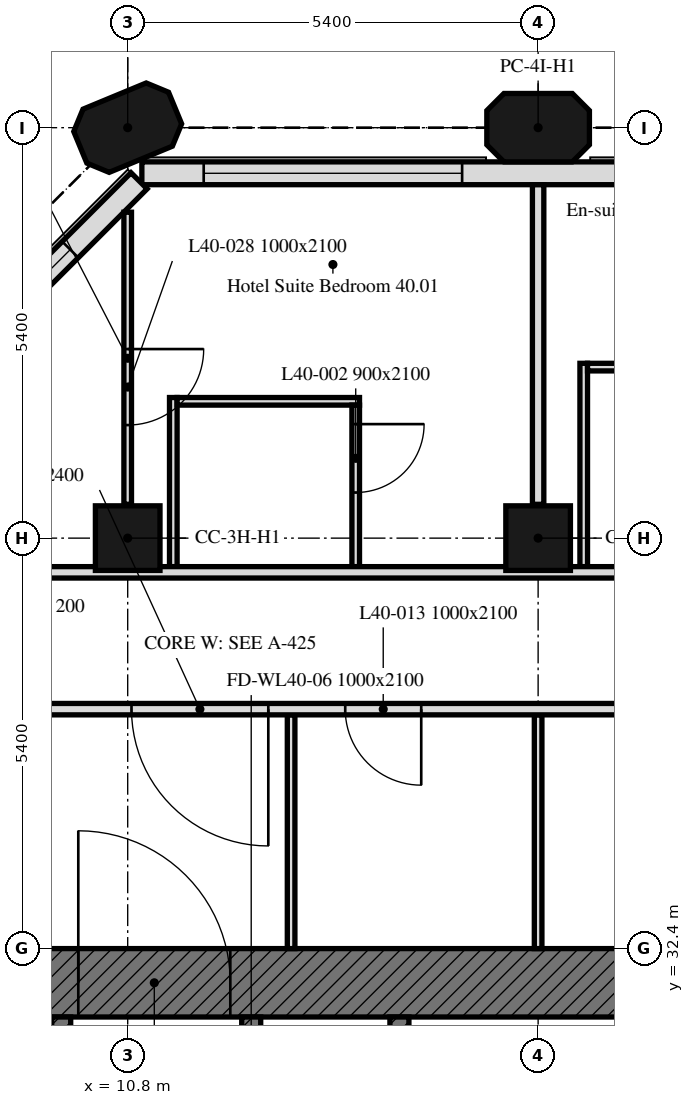
"""IFC4 building model, lengths in metres.
Left out: names, types, materials, properties, quantities, classifications, styles, units other than length and angle.
Written with IfcOpenShell. Run it as: python <this file> out.ifc"""

import sys

from ifc_helpers import new_model, si_unit, direction, frame, frame_2d, origin, origin_2d, place, context, subcontext, project, spatial, polyline, rectangle, outline, extrude, element, fill, save


model = new_model("IFC4")
c1 = context("Model", 3, precision=1e-05, world=origin(), true_north=direction((0.0, 1.0)))
c2 = subcontext(c1, "Body", "Model", "MODEL_VIEW")
j1 = project(units=[si_unit("LENGTHUNIT", "METRE"), si_unit("PLANEANGLEUNIT", "RADIAN")], contexts=[c1])
p1 = place(None, origin())
s1 = spatial("IfcSite", under=j1, at=p1, CompositionType="ELEMENT")
p2 = place(p1, origin())
s2 = spatial("IfcBuilding", under=s1, at=p2, CompositionType="ELEMENT")
p3 = place(p2, frame((0.0, 0.0, 169.3)))
s3 = spatial("IfcBuildingStorey", under=s2, at=p3, CompositionType="ELEMENT", Elevation=169.3)
for number, where, z_axis, x_axis in (
    (1, (10.8, 37.8, 0.0), (0.0, 0.0, 1.0), (1.0, 0.0, 0.0)),
    (2, (16.2, 37.8, 0.0), (0.0, 0.0, 1.0), (1.0, 0.0, 0.0)),
):
    element("IfcColumn", number, at=place(p3, frame(where, z_axis=z_axis, x_axis=x_axis)), inside=s3, PredefinedType="COLUMN", context=c2, shape_type="SweptSolid", body=[
        extrude(rectangle(XDim=0.85, YDim=0.85, at=origin_2d()), origin(), (0.0, 0.0, 1.0), 3.0),
    ])
for number, where, z_axis, x_axis in (
    (3, (10.8, 43.2, 0.0), (0.0, 0.0, 1.0), (0.924, 0.383, 0.0)),
    (4, (16.2, 43.2, 0.0), (0.0, 0.0, 1.0), (1.0, 0.0, 0.0)),
):
    element("IfcColumn", number, at=place(p3, frame(where, z_axis=z_axis, x_axis=x_axis)), inside=s3, PredefinedType="COLUMN", context=c2, shape_type="SweptSolid", body=[
        extrude(outline(polyline([(-0.45, -0.45), (0.45, -0.45), (0.675, -0.225), (0.675, 0.225), (0.45, 0.45), (-0.45, 0.45), (-0.675, 0.225), (-0.675, -0.225), (-0.45, -0.45)])), origin(), (0.0, 0.0, 1.0), 3.0),
    ])
p4 = place(p3, frame((43.014, 42.6, 0.0), z_axis=(0.0, 0.0, 1.0), x_axis=(-1.0, 0.0, 0.0)))
e5 = element("IfcWall", 5, at=p4, inside=s3, PredefinedType="SOLIDWALL", context=c2, shape_type="SweptSolid", body=[
    extrude(rectangle(XDim=32.027, YDim=0.3, at=frame_2d((16.014, 0.0))), origin(), (0.0, 0.0, 1.0), 3.0),
])
p5 = place(p4, frame((2.764, 0.0, 0.9)))
e6 = element("IfcOpeningElement", 6, at=p5, cuts=e5, PredefinedType="OPENING", context=c2, shape_type="SweptSolid", body=[
    extrude(rectangle(XDim=1.1, YDim=1.7, at=frame_2d((0.55, 0.85))), frame((0.0, 0.16, 0.0), z_axis=(0.0, -1.0, 0.0), x_axis=(1.0, 0.0, 0.0)), (0.0, 0.0, 1.0), 0.32),
])
p6 = place(p4, frame((6.214, 0.0, 0.9)))
e7 = element("IfcOpeningElement", 7, at=p6, cuts=e5, PredefinedType="OPENING", context=c2, shape_type="SweptSolid", body=[
    extrude(rectangle(XDim=3.4, YDim=1.7, at=frame_2d((1.7, 0.85))), frame((0.0, 0.16, 0.0), z_axis=(0.0, -1.0, 0.0), x_axis=(1.0, 0.0, 0.0)), (0.0, 0.0, 1.0), 0.32),
])
p7 = place(p4, frame((13.564, 0.0, 0.9)))
e8 = element("IfcOpeningElement", 8, at=p7, cuts=e5, PredefinedType="OPENING", context=c2, shape_type="SweptSolid", body=[
    extrude(rectangle(XDim=1.1, YDim=1.7, at=frame_2d((0.55, 0.85))), frame((0.0, 0.16, 0.0), z_axis=(0.0, -1.0, 0.0), x_axis=(1.0, 0.0, 0.0)), (0.0, 0.0, 1.0), 0.32),
])
p8 = place(p4, frame((17.014, 0.0, 0.9)))
e9 = element("IfcOpeningElement", 9, at=p8, cuts=e5, PredefinedType="OPENING", context=c2, shape_type="SweptSolid", body=[
    extrude(rectangle(XDim=3.4, YDim=1.7, at=frame_2d((1.7, 0.85))), frame((0.0, 0.16, 0.0), z_axis=(0.0, -1.0, 0.0), x_axis=(1.0, 0.0, 0.0)), (0.0, 0.0, 1.0), 0.32),
])
p9 = place(p4, frame((24.364, 0.0, 0.9)))
e10 = element("IfcOpeningElement", 10, at=p9, cuts=e5, PredefinedType="OPENING", context=c2, shape_type="SweptSolid", body=[
    extrude(rectangle(XDim=1.1, YDim=1.7, at=frame_2d((0.55, 0.85))), frame((0.0, 0.16, 0.0), z_axis=(0.0, -1.0, 0.0), x_axis=(1.0, 0.0, 0.0)), (0.0, 0.0, 1.0), 0.32),
])
p10 = place(p4, frame((27.814, 0.0, 0.9)))
e11 = element("IfcOpeningElement", 11, at=p10, cuts=e5, PredefinedType="OPENING", context=c2, shape_type="SweptSolid", body=[
    extrude(rectangle(XDim=3.4, YDim=1.7, at=frame_2d((1.7, 0.85))), frame((0.0, 0.16, 0.0), z_axis=(0.0, -1.0, 0.0), x_axis=(1.0, 0.0, 0.0)), (0.0, 0.0, 1.0), 0.32),
])
p11 = place(p3, frame((10.949, 42.501, 0.0), z_axis=(0.0, 0.0, 1.0), x_axis=(-0.707106781187, -0.707106781187, 0.0)))
e12 = element("IfcWall", 12, at=p11, inside=s3, PredefinedType="SOLIDWALL", context=c2, shape_type="SweptSolid", body=[
    extrude(rectangle(XDim=6.86, YDim=0.3, at=frame_2d((3.43, 0.0))), origin(), (0.0, 0.0, 1.0), 3.0),
])
p12 = place(p11, frame((1.28, 0.0, 0.9)))
e13 = element("IfcOpeningElement", 13, at=p12, cuts=e12, PredefinedType="OPENING", context=c2, shape_type="SweptSolid", body=[
    extrude(rectangle(XDim=1.1, YDim=1.7, at=frame_2d((0.55, 0.85))), frame((0.0, 0.16, 0.0), z_axis=(0.0, -1.0, 0.0), x_axis=(1.0, 0.0, 0.0)), (0.0, 0.0, 1.0), 0.32),
])
p13 = place(p11, frame((4.48, 0.0, 0.9)))
e14 = element("IfcOpeningElement", 14, at=p13, cuts=e12, PredefinedType="OPENING", context=c2, shape_type="SweptSolid", body=[
    extrude(rectangle(XDim=1.1, YDim=1.7, at=frame_2d((0.55, 0.85))), frame((0.0, 0.16, 0.0), z_axis=(0.0, -1.0, 0.0), x_axis=(1.0, 0.0, 0.0)), (0.0, 0.0, 1.0), 0.32),
])
p14 = place(p3, frame((6.6, 31.95, 0.0), z_axis=(0.0, 0.0, 1.0), x_axis=(1.0, 0.0, 0.0)))
e15 = element("IfcWall", 15, at=p14, inside=s3, PredefinedType="SOLIDWALL", context=c2, shape_type="SweptSolid", body=[
    extrude(rectangle(XDim=11.1, YDim=0.9, at=frame_2d((5.55, 0.0))), origin(), (0.0, 0.0, 1.0), 3.0),
])
p15 = place(p14, frame((3.55, 0.0, 0.0)))
e16 = element("IfcOpeningElement", 16, at=p15, cuts=e15, PredefinedType="OPENING", context=c2, shape_type="SweptSolid", body=[
    extrude(rectangle(XDim=2.0, YDim=2.4, at=frame_2d((1.0, 1.2))), frame((0.0, 0.45, 0.0), z_axis=(0.0, -1.0, 0.0), x_axis=(1.0, 0.0, 0.0)), (0.0, 0.0, 1.0), 0.9),
])
p16 = place(p3, frame((9.925, 17.1, 0.0), z_axis=(0.0, 0.0, 1.0), x_axis=(0.0, 1.0, 0.0)))
e17 = element("IfcWall", 17, at=p16, inside=s3, PredefinedType="SOLIDWALL", context=c2, shape_type="SweptSolid", body=[
    extrude(rectangle(XDim=14.4, YDim=0.25, at=frame_2d((7.2, 0.0))), origin(), (0.0, 0.0, 1.0), 3.0),
])
p17 = place(p16, frame((4.6, 0.0, 0.0)))
e18 = element("IfcOpeningElement", 18, at=p17, cuts=e17, PredefinedType="OPENING", context=c2, shape_type="SweptSolid", body=[
    extrude(rectangle(XDim=1.0, YDim=2.1, at=frame_2d((0.5, 1.05))), frame((0.0, 0.125, 0.0), z_axis=(0.0, -1.0, 0.0), x_axis=(1.0, 0.0, 0.0)), (0.0, 0.0, 1.0), 0.25),
])
p18 = place(p16, frame((7.062, 0.0, 0.0)))
e19 = element("IfcOpeningElement", 19, at=p18, cuts=e17, PredefinedType="OPENING", context=c2, shape_type="SweptSolid", body=[
    extrude(rectangle(XDim=1.2, YDim=2.1, at=frame_2d((0.6, 1.05))), frame((0.0, 0.125, 0.0), z_axis=(0.0, -1.0, 0.0), x_axis=(1.0, 0.0, 0.0)), (0.0, 0.0, 1.0), 0.25),
])
p19 = place(p16, frame((10.106, 0.0, 0.0)))
e20 = element("IfcOpeningElement", 20, at=p19, cuts=e17, PredefinedType="OPENING", context=c2, shape_type="SweptSolid", body=[
    extrude(rectangle(XDim=0.9, YDim=2.1, at=frame_2d((0.45, 1.05))), frame((0.0, 0.125, 0.0), z_axis=(0.0, -1.0, 0.0), x_axis=(1.0, 0.0, 0.0)), (0.0, 0.0, 1.0), 0.25),
])
p20 = place(p16, frame((12.048, 0.0, 0.0)))
e21 = element("IfcOpeningElement", 21, at=p20, cuts=e17, PredefinedType="OPENING", context=c2, shape_type="SweptSolid", body=[
    extrude(rectangle(XDim=0.9, YDim=2.1, at=frame_2d((0.45, 1.05))), frame((0.0, 0.125, 0.0), z_axis=(0.0, -1.0, 0.0), x_axis=(1.0, 0.0, 0.0)), (0.0, 0.0, 1.0), 0.25),
])
p21 = place(p16, frame((13.354, 0.0, 0.0)))
e22 = element("IfcOpeningElement", 22, at=p21, cuts=e17, PredefinedType="OPENING", context=c2, shape_type="SweptSolid", body=[
    extrude(rectangle(XDim=0.9, YDim=2.1, at=frame_2d((0.45, 1.05))), frame((0.0, 0.125, 0.0), z_axis=(0.0, -1.0, 0.0), x_axis=(1.0, 0.0, 0.0)), (0.0, 0.0, 1.0), 0.25),
])
p22 = place(p3, frame((14.375, 17.1, 0.0), z_axis=(0.0, 0.0, 1.0), x_axis=(0.0, 1.0, 0.0)))
e23 = element("IfcWall", 23, at=p22, inside=s3, PredefinedType="SOLIDWALL", context=c2, shape_type="SweptSolid", body=[
    extrude(rectangle(XDim=14.4, YDim=0.25, at=frame_2d((7.2, 0.0))), origin(), (0.0, 0.0, 1.0), 3.0),
])
p23 = place(p22, frame((13.15, 0.0, 0.0)))
e24 = element("IfcOpeningElement", 24, at=p23, cuts=e23, PredefinedType="OPENING", context=c2, shape_type="SweptSolid", body=[
    extrude(rectangle(XDim=1.0, YDim=2.1, at=frame_2d((0.5, 1.05))), frame((0.0, 0.125, 0.0), z_axis=(0.0, -1.0, 0.0), x_axis=(1.0, 0.0, 0.0)), (0.0, 0.0, 1.0), 0.25),
])
p24 = place(p22, frame((0.6, 0.0, 0.0)))
e25 = element("IfcOpeningElement", 25, at=p24, cuts=e23, PredefinedType="OPENING", context=c2, shape_type="SweptSolid", body=[
    extrude(rectangle(XDim=1.1, YDim=2.1, at=frame_2d((0.55, 1.05))), frame((0.0, 0.125, 0.0), z_axis=(0.0, -1.0, 0.0), x_axis=(1.0, 0.0, 0.0)), (0.0, 0.0, 1.0), 0.25),
])
p25 = place(p22, frame((3.25, 0.0, 0.0)))
e26 = element("IfcOpeningElement", 26, at=p25, cuts=e23, PredefinedType="OPENING", context=c2, shape_type="SweptSolid", body=[
    extrude(rectangle(XDim=0.9, YDim=2.1, at=frame_2d((0.45, 1.05))), frame((0.0, 0.125, 0.0), z_axis=(0.0, -1.0, 0.0), x_axis=(1.0, 0.0, 0.0)), (0.0, 0.0, 1.0), 0.25),
])
p26 = place(p3, frame((12.425, 29.4, 0.0), z_axis=(0.0, 0.0, 1.0), x_axis=(0.0, 1.0, 0.0)))
e27 = element("IfcWall", 27, at=p26, inside=s3, PredefinedType="SOLIDWALL", context=c2, shape_type="SweptSolid", body=[
    extrude(rectangle(XDim=2.1, YDim=0.25, at=frame_2d((1.05, 0.0))), origin(), (0.0, 0.0, 1.0), 3.0),
])
p27 = place(p26, frame((0.5, 0.0, 0.0)))
e28 = element("IfcOpeningElement", 28, at=p27, cuts=e27, PredefinedType="OPENING", context=c2, shape_type="SweptSolid", body=[
    extrude(rectangle(XDim=1.0, YDim=2.1, at=frame_2d((0.5, 1.05))), frame((0.0, 0.125, 0.0), z_axis=(0.0, -1.0, 0.0), x_axis=(1.0, 0.0, 0.0)), (0.0, 0.0, 1.0), 0.25),
])
p28 = place(p3, frame((10.8, 42.088, 0.0), z_axis=(0.0, 0.0, 1.0), x_axis=(0.0, -1.0, 0.0)))
e29 = element("IfcWall", 29, at=p28, inside=s3, PredefinedType="PARTITIONING", context=c2, shape_type="SweptSolid", body=[
    extrude(rectangle(XDim=3.843, YDim=0.1, at=frame_2d((1.921, 0.0))), origin(), (0.0, 0.0, 1.0), 3.0),
])
p29 = place(p28, frame((1.8, 0.0, 0.0)))
e30 = element("IfcOpeningElement", 30, at=p29, cuts=e29, PredefinedType="OPENING", context=c2, shape_type="SweptSolid", body=[
    extrude(rectangle(XDim=1.0, YDim=2.1, at=frame_2d((0.5, 1.05))), frame((0.0, 0.05, 0.0), z_axis=(0.0, -1.0, 0.0), x_axis=(1.0, 0.0, 0.0)), (0.0, 0.0, 1.0), 0.1),
])
p30 = place(p3, frame((11.4, 37.425, 0.0), z_axis=(0.0, 0.0, 1.0), x_axis=(0.0, 1.0, 0.0)))
e31 = element("IfcWall", 31, at=p30, inside=s3, PredefinedType="PARTITIONING", context=c2, shape_type="SweptSolid", body=[
    extrude(rectangle(XDim=2.225, YDim=0.1, at=frame_2d((1.112, 0.0))), origin(), (0.0, 0.0, 1.0), 3.0),
])
p31 = place(p3, frame((11.45, 39.6, 0.0), z_axis=(0.0, 0.0, 1.0), x_axis=(1.0, 0.0, 0.0)))
e32 = element("IfcWall", 32, at=p31, inside=s3, PredefinedType="PARTITIONING", context=c2, shape_type="SweptSolid", body=[
    extrude(rectangle(XDim=2.4, YDim=0.1, at=frame_2d((1.2, 0.0))), origin(), (0.0, 0.0, 1.0), 3.0),
])
p32 = place(p3, frame((13.8, 39.55, 0.0), z_axis=(0.0, 0.0, 1.0), x_axis=(0.0, -1.0, 0.0)))
e33 = element("IfcWall", 33, at=p32, inside=s3, PredefinedType="PARTITIONING", context=c2, shape_type="SweptSolid", body=[
    extrude(rectangle(XDim=2.125, YDim=0.1, at=frame_2d((1.062, 0.0))), origin(), (0.0, 0.0, 1.0), 3.0),
])
p33 = place(p32, frame((0.25, 0.0, 0.0)))
e34 = element("IfcOpeningElement", 34, at=p33, cuts=e33, PredefinedType="OPENING", context=c2, shape_type="SweptSolid", body=[
    extrude(rectangle(XDim=0.9, YDim=2.1, at=frame_2d((0.45, 1.05))), frame((0.0, 0.05, 0.0), z_axis=(0.0, -1.0, 0.0), x_axis=(1.0, 0.0, 0.0)), (0.0, 0.0, 1.0), 0.1),
])
p34 = place(p3, frame((16.2, 38.245, 0.0), z_axis=(0.0, 0.0, 1.0), x_axis=(0.0, 1.0, 0.0)))
e35 = element("IfcWall", 35, at=p34, inside=s3, PredefinedType="PARTITIONING", context=c2, shape_type="SweptSolid", body=[
    extrude(rectangle(XDim=4.204, YDim=0.15, at=frame_2d((2.102, 0.0))), origin(), (0.0, 0.0, 1.0), 3.0),
])
p35 = place(p3, frame((16.8, 37.425, 0.0), z_axis=(0.0, 0.0, 1.0), x_axis=(0.0, 1.0, 0.0)))
e36 = element("IfcWall", 36, at=p35, inside=s3, PredefinedType="PARTITIONING", context=c2, shape_type="SweptSolid", body=[
    extrude(rectangle(XDim=2.675, YDim=0.1, at=frame_2d((1.337, 0.0))), origin(), (0.0, 0.0, 1.0), 3.0),
])
p36 = place(p3, frame((16.85, 40.05, 0.0), z_axis=(0.0, 0.0, 1.0), x_axis=(1.0, 0.0, 0.0)))
e37 = element("IfcWall", 37, at=p36, inside=s3, PredefinedType="PARTITIONING", context=c2, shape_type="SweptSolid", body=[
    extrude(rectangle(XDim=2.1, YDim=0.1, at=frame_2d((1.05, 0.0))), origin(), (0.0, 0.0, 1.0), 3.0),
])
p37 = place(p3, frame((47.849, 37.35, 0.0), z_axis=(0.0, 0.0, 1.0), x_axis=(-1.0, 0.0, 0.0)))
e38 = element("IfcWall", 38, at=p37, inside=s3, PredefinedType="PARTITIONING", context=c2, shape_type="SweptSolid", body=[
    extrude(rectangle(XDim=41.698, YDim=0.15, at=frame_2d((20.849, 0.0))), origin(), (0.0, 0.0, 1.0), 3.0),
])
p38 = place(p37, frame((39.249, 0.0, 0.0)))
e39 = element("IfcOpeningElement", 39, at=p38, cuts=e38, PredefinedType="OPENING", context=c2, shape_type="SweptSolid", body=[
    extrude(rectangle(XDim=1.0, YDim=2.1, at=frame_2d((0.5, 1.05))), frame((0.0, 0.075, 0.0), z_axis=(0.0, -1.0, 0.0), x_axis=(1.0, 0.0, 0.0)), (0.0, 0.0, 1.0), 0.15),
])
p39 = place(p37, frame((27.649, 0.0, 0.0)))
e40 = element("IfcOpeningElement", 40, at=p39, cuts=e38, PredefinedType="OPENING", context=c2, shape_type="SweptSolid", body=[
    extrude(rectangle(XDim=1.0, YDim=2.1, at=frame_2d((0.5, 1.05))), frame((0.0, 0.075, 0.0), z_axis=(0.0, -1.0, 0.0), x_axis=(1.0, 0.0, 0.0)), (0.0, 0.0, 1.0), 0.15),
])
p40 = place(p37, frame((22.249, 0.0, 0.0)))
e41 = element("IfcOpeningElement", 41, at=p40, cuts=e38, PredefinedType="OPENING", context=c2, shape_type="SweptSolid", body=[
    extrude(rectangle(XDim=1.0, YDim=2.1, at=frame_2d((0.5, 1.05))), frame((0.0, 0.075, 0.0), z_axis=(0.0, -1.0, 0.0), x_axis=(1.0, 0.0, 0.0)), (0.0, 0.0, 1.0), 0.15),
])
p41 = place(p37, frame((17.649, 0.0, 0.0)))
e42 = element("IfcOpeningElement", 42, at=p41, cuts=e38, PredefinedType="OPENING", context=c2, shape_type="SweptSolid", body=[
    extrude(rectangle(XDim=1.0, YDim=2.1, at=frame_2d((0.5, 1.05))), frame((0.0, 0.075, 0.0), z_axis=(0.0, -1.0, 0.0), x_axis=(1.0, 0.0, 0.0)), (0.0, 0.0, 1.0), 0.15),
])
p42 = place(p37, frame((2.744, 0.0, 0.0)))
e43 = element("IfcOpeningElement", 43, at=p42, cuts=e38, PredefinedType="OPENING", context=c2, shape_type="SweptSolid", body=[
    extrude(rectangle(XDim=1.0, YDim=2.1, at=frame_2d((0.5, 1.05))), frame((0.0, 0.075, 0.0), z_axis=(0.0, -1.0, 0.0), x_axis=(1.0, 0.0, 0.0)), (0.0, 0.0, 1.0), 0.15),
])
for number, where, z_axis, x_axis in (
    (44, (16.2, 35.475, 0.0), (0.0, 0.0, 1.0), (0.0, -1.0, 0.0)),
    (45, (12.95, 32.4, 0.0), (0.0, 0.0, 1.0), (0.0, 1.0, 0.0)),
):
    element("IfcWall", number, at=place(p3, frame(where, z_axis=z_axis, x_axis=x_axis)), inside=s3, PredefinedType="PARTITIONING", context=c2, shape_type="SweptSolid", body=[
        extrude(rectangle(XDim=3.075, YDim=0.1, at=frame_2d((1.538, 0.0))), origin(), (0.0, 0.0, 1.0), 3.0),
    ])
p43 = place(p3, frame((43.275, 35.55, 0.0), z_axis=(0.0, 0.0, 1.0), x_axis=(-1.0, 0.0, 0.0)))
e46 = element("IfcWall", 46, at=p43, inside=s3, PredefinedType="PARTITIONING", context=c2, shape_type="SweptSolid", body=[
    extrude(rectangle(XDim=33.825, YDim=0.15, at=frame_2d((16.913, 0.0))), origin(), (0.0, 0.0, 1.0), 3.0),
])
p44 = place(p43, frame((23.875, 0.0, 0.0)))
e47 = element("IfcOpeningElement", 47, at=p44, cuts=e46, PredefinedType="OPENING", context=c2, shape_type="SweptSolid", body=[
    extrude(rectangle(XDim=1.0, YDim=2.1, at=frame_2d((0.5, 1.05))), frame((0.0, 0.075, 0.0), z_axis=(0.0, -1.0, 0.0), x_axis=(1.0, 0.0, 0.0)), (0.0, 0.0, 1.0), 0.15),
])
p45 = place(p43, frame((13.475, 0.0, 0.0)))
e48 = element("IfcOpeningElement", 48, at=p45, cuts=e46, PredefinedType="OPENING", context=c2, shape_type="SweptSolid", body=[
    extrude(rectangle(XDim=1.0, YDim=2.1, at=frame_2d((0.5, 1.05))), frame((0.0, 0.075, 0.0), z_axis=(0.0, -1.0, 0.0), x_axis=(1.0, 0.0, 0.0)), (0.0, 0.0, 1.0), 0.15),
])
p46 = place(p43, frame((8.337, 0.0, 0.0)))
e49 = element("IfcOpeningElement", 49, at=p46, cuts=e46, PredefinedType="OPENING", context=c2, shape_type="SweptSolid", body=[
    extrude(rectangle(XDim=1.0, YDim=2.1, at=frame_2d((0.5, 1.05))), frame((0.0, 0.075, 0.0), z_axis=(0.0, -1.0, 0.0), x_axis=(1.0, 0.0, 0.0)), (0.0, 0.0, 1.0), 0.15),
])
p47 = place(p43, frame((1.648, 0.0, 0.0)))
e50 = element("IfcOpeningElement", 50, at=p47, cuts=e46, PredefinedType="OPENING", context=c2, shape_type="SweptSolid", body=[
    extrude(rectangle(XDim=1.0, YDim=2.1, at=frame_2d((0.5, 1.05))), frame((0.0, 0.075, 0.0), z_axis=(0.0, -1.0, 0.0), x_axis=(1.0, 0.0, 0.0)), (0.0, 0.0, 1.0), 0.15),
])
p48 = place(p43, frame((28.613, 0.0, 0.0)))
e51 = element("IfcOpeningElement", 51, at=p48, cuts=e46, PredefinedType="OPENING", context=c2, shape_type="SweptSolid", body=[
    extrude(rectangle(XDim=1.0, YDim=2.1, at=frame_2d((0.5, 1.05))), frame((0.0, 0.075, 0.0), z_axis=(0.0, -1.0, 0.0), x_axis=(1.0, 0.0, 0.0)), (0.0, 0.0, 1.0), 0.15),
])
p49 = place(p43, frame((30.625, 0.0, 0.0)))
e52 = element("IfcOpeningElement", 52, at=p49, cuts=e46, PredefinedType="OPENING", context=c2, shape_type="SweptSolid", body=[
    extrude(rectangle(XDim=1.8, YDim=2.4, at=frame_2d((0.9, 1.2))), frame((0.0, 0.075, 0.0), z_axis=(0.0, -1.0, 0.0), x_axis=(1.0, 0.0, 0.0)), (0.0, 0.0, 1.0), 0.15),
])
p50 = place(p43, frame((5.525, 0.0, 0.0)))
e53 = element("IfcOpeningElement", 53, at=p50, cuts=e46, PredefinedType="OPENING", context=c2, shape_type="SweptSolid", body=[
    extrude(rectangle(XDim=1.8, YDim=2.4, at=frame_2d((0.9, 1.2))), frame((0.0, 0.075, 0.0), z_axis=(0.0, -1.0, 0.0), x_axis=(1.0, 0.0, 0.0)), (0.0, 0.0, 1.0), 0.15),
])
p51 = place(p10, origin())
e54 = element("IfcWindow", 54, at=p51, inside=s3, PartitioningType="SINGLE_PANEL", PredefinedType="WINDOW", context=c2, shape_type="SweptSolid", body=[
    extrude(rectangle(XDim=3.4, YDim=1.7, at=frame_2d((1.7, 0.85))), frame((0.0, 0.03, 0.0), z_axis=(0.0, -1.0, 0.0), x_axis=(1.0, 0.0, 0.0)), (0.0, 0.0, 1.0), 0.06),
])
fill(e11, e54)
p52 = place(p12, origin())
e55 = element("IfcWindow", 55, at=p52, inside=s3, PartitioningType="SINGLE_PANEL", PredefinedType="WINDOW", context=c2, shape_type="SweptSolid", body=[
    extrude(rectangle(XDim=1.1, YDim=1.7, at=frame_2d((0.55, 0.85))), frame((0.0, 0.03, 0.0), z_axis=(0.0, -1.0, 0.0), x_axis=(1.0, 0.0, 0.0)), (0.0, 0.0, 1.0), 0.06),
])
fill(e13, e55)
p53 = place(p15, origin())
e56 = element("IfcDoor", 56, at=p53, inside=s3, OperationType="DOUBLE_DOOR_SINGLE_SWING", PredefinedType="DOOR", context=c2, shape_type="SweptSolid", body=[
    extrude(rectangle(XDim=2.0, YDim=2.4, at=frame_2d((1.0, 1.2))), frame((0.0, 0.025, 0.0), z_axis=(0.0, -1.0, 0.0), x_axis=(1.0, 0.0, 0.0)), (0.0, 0.0, 1.0), 0.05),
])
fill(e16, e56)
p54 = place(p33, origin())
e57 = element("IfcDoor", 57, at=p54, inside=s3, OperationType="SINGLE_SWING_RIGHT", PredefinedType="DOOR", context=c2, shape_type="SweptSolid", body=[
    extrude(rectangle(XDim=0.9, YDim=2.1, at=frame_2d((0.45, 1.05))), frame((0.0, 0.025, 0.0), z_axis=(0.0, -1.0, 0.0), x_axis=(1.0, 0.0, 0.0)), (0.0, 0.0, 1.0), 0.05),
])
fill(e34, e57)
p55 = place(p48, origin())
e58 = element("IfcDoor", 58, at=p55, inside=s3, OperationType="SINGLE_SWING_LEFT", PredefinedType="DOOR", context=c2, shape_type="SweptSolid", body=[
    extrude(rectangle(XDim=1.0, YDim=2.1, at=frame_2d((0.5, 1.05))), frame((0.0, 0.025, 0.0), z_axis=(0.0, -1.0, 0.0), x_axis=(1.0, 0.0, 0.0)), (0.0, 0.0, 1.0), 0.05),
])
fill(e51, e58)
p56 = place(p29, origin())
e59 = element("IfcDoor", 59, at=p56, inside=s3, OperationType="SINGLE_SWING_RIGHT", PredefinedType="DOOR", context=c2, shape_type="SweptSolid", body=[
    extrude(rectangle(XDim=1.0, YDim=2.1, at=frame_2d((0.5, 1.05))), frame((0.0, 0.025, 0.0), z_axis=(0.0, -1.0, 0.0), x_axis=(1.0, 0.0, 0.0)), (0.0, 0.0, 1.0), 0.05),
])
fill(e30, e59)
p57 = place(p49, origin())
e60 = element("IfcDoor", 60, at=p57, inside=s3, OperationType="DOUBLE_DOOR_SINGLE_SWING", PredefinedType="DOOR", context=c2, shape_type="SweptSolid", body=[
    extrude(rectangle(XDim=1.8, YDim=2.4, at=frame_2d((0.9, 1.2))), frame((0.0, 0.025, 0.0), z_axis=(0.0, -1.0, 0.0), x_axis=(1.0, 0.0, 0.0)), (0.0, 0.0, 1.0), 0.05),
])
fill(e52, e60)
save(model, sys.argv[1])
